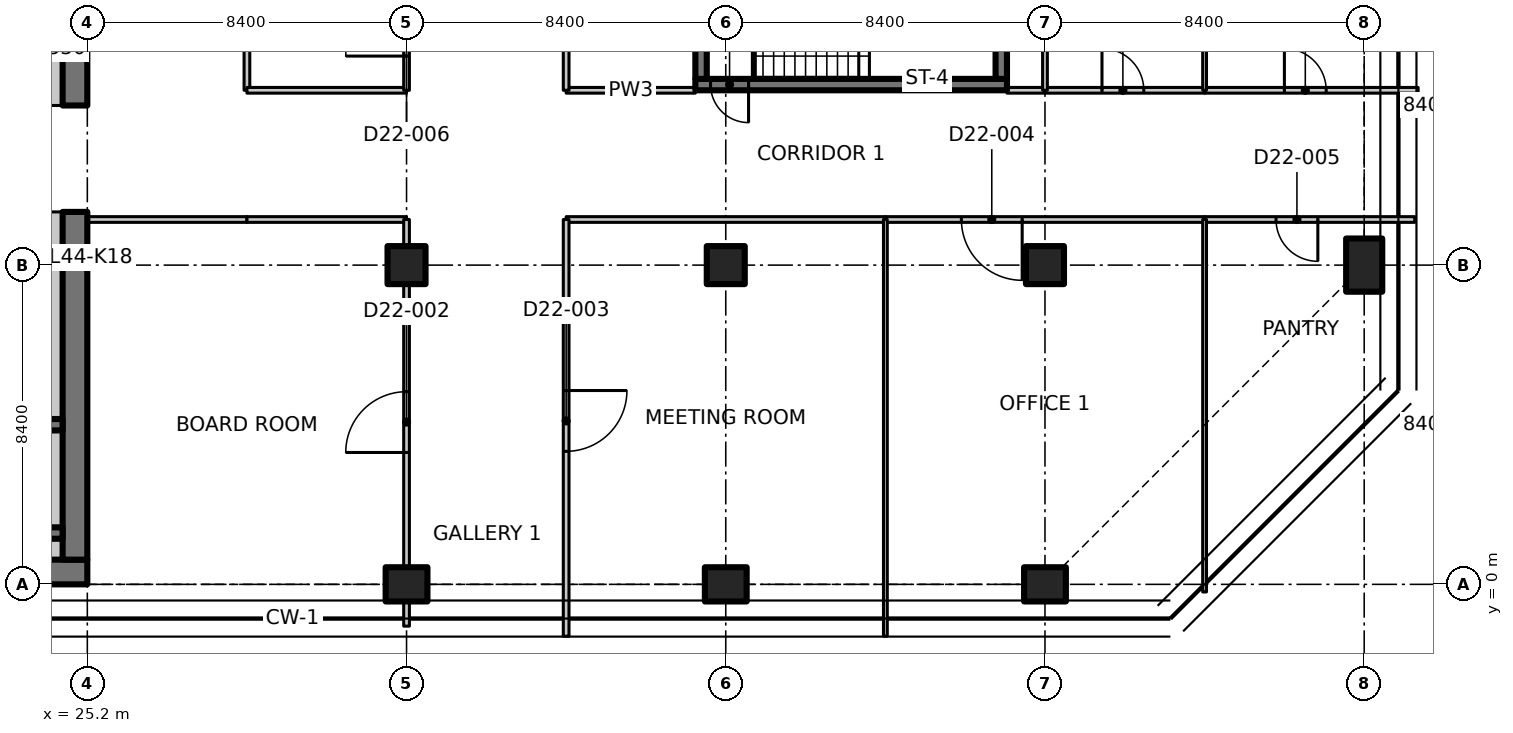
"""IFC4 building model, lengths in metres.
Left out: names, types, materials, properties, quantities, classifications, styles, units other than length and angle.
Written with IfcOpenShell. Run it as: python <this file> out.ifc"""

import sys

from ifc_helpers import new_model, si_unit, direction, frame, frame_2d, origin, origin_2d, place, context, subcontext, project, spatial, polyline, rectangle, outline, extrude, element, fill, save


model = new_model("IFC4")
c1 = context("Model", 3, precision=1e-05, world=origin(), true_north=direction((0.0, 1.0)))
c2 = subcontext(c1, "Body", "Model", "MODEL_VIEW")
j1 = project(units=[si_unit("LENGTHUNIT", "METRE"), si_unit("PLANEANGLEUNIT", "RADIAN")], contexts=[c1])
p1 = place(None, origin())
s1 = spatial("IfcSite", under=j1, at=p1, CompositionType="ELEMENT")
p2 = place(p1, origin())
s2 = spatial("IfcBuilding", under=s1, at=p2, CompositionType="ELEMENT")
p3 = place(p2, frame((0.0, 0.0, 177.6)))
s3 = spatial("IfcBuildingStorey", under=s2, at=p3, CompositionType="ELEMENT", Elevation=177.6)
p4 = place(p3, frame((33.6, 0.0, 0.0), z_axis=(0.0, 0.0, 1.0), x_axis=(0.0, 1.0, 0.0)))
e1 = element("IfcColumn", 1, at=p4, inside=s3, PredefinedType="COLUMN", context=c2, shape_type="SweptSolid", body=[
    extrude(rectangle(XDim=0.9, YDim=1.1, at=origin_2d()), origin(), (0.0, 0.0, 1.0), 3.35),
])
p5 = place(p3, frame((33.6, 8.4, 0.0), z_axis=(0.0, 0.0, 1.0), x_axis=(1.0, 0.0, 0.0)))
e2 = element("IfcColumn", 2, at=p5, inside=s3, PredefinedType="COLUMN", context=c2, shape_type="SweptSolid", body=[
    extrude(rectangle(XDim=1.0, YDim=1.0, at=origin_2d()), origin(), (0.0, 0.0, 1.0), 3.35),
])
p6 = place(p3, frame((42.0, 0.0, 0.0), z_axis=(0.0, 0.0, 1.0), x_axis=(0.0, 1.0, 0.0)))
e3 = element("IfcColumn", 3, at=p6, inside=s3, PredefinedType="COLUMN", context=c2, shape_type="SweptSolid", body=[
    extrude(rectangle(XDim=0.9, YDim=1.1, at=origin_2d()), origin(), (0.0, 0.0, 1.0), 3.35),
])
p7 = place(p3, frame((42.0, 8.4, 0.0), z_axis=(0.0, 0.0, 1.0), x_axis=(1.0, 0.0, 0.0)))
e4 = element("IfcColumn", 4, at=p7, inside=s3, PredefinedType="COLUMN", context=c2, shape_type="SweptSolid", body=[
    extrude(rectangle(XDim=1.0, YDim=1.0, at=origin_2d()), origin(), (0.0, 0.0, 1.0), 3.35),
])
p8 = place(p3, frame((50.4, 0.0, 0.0), z_axis=(0.0, 0.0, 1.0), x_axis=(0.0, 1.0, 0.0)))
e5 = element("IfcColumn", 5, at=p8, inside=s3, PredefinedType="COLUMN", context=c2, shape_type="SweptSolid", body=[
    extrude(rectangle(XDim=0.9, YDim=1.1, at=origin_2d()), origin(), (0.0, 0.0, 1.0), 3.35),
])
p9 = place(p3, frame((50.4, 8.4, 0.0), z_axis=(0.0, 0.0, 1.0), x_axis=(1.0, 0.0, 0.0)))
e6 = element("IfcColumn", 6, at=p9, inside=s3, PredefinedType="COLUMN", context=c2, shape_type="SweptSolid", body=[
    extrude(rectangle(XDim=1.0, YDim=1.0, at=origin_2d()), origin(), (0.0, 0.0, 1.0), 3.35),
])
p10 = place(p3, frame((58.8, 8.4, 0.0), z_axis=(0.0, 0.0, 1.0), x_axis=(1.0, 0.0, 0.0)))
e7 = element("IfcColumn", 7, at=p10, inside=s3, PredefinedType="COLUMN", context=c2, shape_type="SweptSolid", body=[
    extrude(rectangle(XDim=0.95, YDim=1.4, at=origin_2d()), origin(), (0.0, 0.0, 1.0), 3.35),
])
p11 = place(p3, frame((7.286, 0.325, 0.0), z_axis=(0.0, 0.0, 1.0), x_axis=(1.0, 0.0, 0.0)))
e8 = element("IfcWall", 8, at=p11, inside=s3, PredefinedType="SHEAR", context=c2, shape_type="SweptSolid", body=[
    extrude(rectangle(XDim=17.914, YDim=0.65, at=frame_2d((8.957, 0.0))), origin(), (0.0, 0.0, 1.0), 3.35),
])
p12 = place(p3, frame((24.875, 0.65, 0.0), z_axis=(0.0, 0.0, 1.0), x_axis=(0.0, 1.0, 0.0)))
e9 = element("IfcWall", 9, at=p12, inside=s3, PredefinedType="SHEAR", context=c2, shape_type="SweptSolid", body=[
    extrude(rectangle(XDim=9.15, YDim=0.65, at=frame_2d((4.575, 0.0))), origin(), (0.0, 0.0, 1.0), 3.35),
])
p13 = place(p3, frame((24.875, 12.6, 0.0), z_axis=(0.0, 0.0, 1.0), x_axis=(0.0, 1.0, 0.0)))
e10 = element("IfcWall", 10, at=p13, inside=s3, PredefinedType="SHEAR", context=c2, shape_type="SweptSolid", body=[
    extrude(rectangle(XDim=3.55, YDim=0.65, at=frame_2d((1.775, 0.0))), origin(), (0.0, 0.0, 1.0), 3.35),
])
p14 = place(p3, frame((24.275, 12.6, 0.0), z_axis=(0.0, 0.0, 1.0), x_axis=(0.0, 1.0, 0.0)))
e11 = element("IfcWall", 11, at=p14, inside=s3, PredefinedType="PARTITIONING", context=c2, shape_type="SweptSolid", body=[
    extrude(rectangle(XDim=3.0, YDim=0.55, at=frame_2d((1.5, 0.0))), origin(), (0.0, 0.0, 1.0), 3.35),
])
p15 = place(p3, frame((15.8, 1.35, 0.0), z_axis=(0.0, 0.0, 1.0), x_axis=(1.0, 0.0, 0.0)))
e12 = element("IfcWall", 12, at=p15, inside=s3, PredefinedType="SHEAR", context=c2, shape_type="SweptSolid", body=[
    extrude(rectangle(XDim=8.75, YDim=0.3, at=frame_2d((4.375, 0.0))), origin(), (0.0, 0.0, 1.0), 3.35),
])
p16 = place(p3, frame((15.8, 4.2, 0.0), z_axis=(0.0, 0.0, 1.0), x_axis=(1.0, 0.0, 0.0)))
e13 = element("IfcWall", 13, at=p16, inside=s3, PredefinedType="SHEAR", context=c2, shape_type="SweptSolid", body=[
    extrude(rectangle(XDim=8.75, YDim=0.3, at=frame_2d((4.375, 0.0))), origin(), (0.0, 0.0, 1.0), 3.35),
])
p17 = place(p16, frame((0.4, 0.0, 0.0)))
e14 = element("IfcOpeningElement", 14, at=p17, cuts=e13, PredefinedType="OPENING", context=c2, shape_type="SweptSolid", body=[
    extrude(rectangle(XDim=1.0, YDim=2.1, at=frame_2d((0.5, 1.05))), frame((0.0, 0.16, 0.0), z_axis=(0.0, -1.0, 0.0), x_axis=(1.0, 0.0, 0.0)), (0.0, 0.0, 1.0), 0.32),
])
p18 = place(p3, frame((49.4, 13.15, 0.0), z_axis=(0.0, 0.0, 1.0), x_axis=(-1.0, 0.0, 0.0)))
e15 = element("IfcWall", 15, at=p18, inside=s3, PredefinedType="SHEAR", context=c2, shape_type="SweptSolid", body=[
    extrude(rectangle(XDim=8.2, YDim=0.3, at=frame_2d((4.1, 0.0))), origin(), (0.0, 0.0, 1.0), 3.35),
])
p19 = place(p18, frame((6.8, 0.0, 0.0)))
e16 = element("IfcOpeningElement", 16, at=p19, cuts=e15, PredefinedType="OPENING", context=c2, shape_type="SweptSolid", body=[
    extrude(rectangle(XDim=1.0, YDim=2.1, at=frame_2d((0.5, 1.05))), frame((0.0, 0.16, 0.0), z_axis=(0.0, -1.0, 0.0), x_axis=(1.0, 0.0, 0.0)), (0.0, 0.0, 1.0), 0.32),
])
for number, where, z_axis, x_axis in (
    (17, (41.35, 13.3, 0.0), (0.0, 0.0, 1.0), (0.0, 1.0, 0.0)),
    (18, (49.25, 13.3, 0.0), (0.0, 0.0, 1.0), (0.0, 1.0, 0.0)),
):
    element("IfcWall", number, at=place(p3, frame(where, z_axis=z_axis, x_axis=x_axis)), inside=s3, PredefinedType="SHEAR", context=c2, shape_type="SweptSolid", body=[
        extrude(rectangle(XDim=2.55, YDim=0.3, at=frame_2d((1.275, 0.0))), origin(), (0.0, 0.0, 1.0), 3.35),
    ])
p20 = place(p3, frame((13.35, 0.925, 0.0), z_axis=(0.0, 0.0, 1.0), x_axis=(1.0, 0.0, 0.0)))
e19 = element("IfcWall", 19, at=p20, inside=s3, PredefinedType="PARTITIONING", context=c2, shape_type="SweptSolid", body=[
    extrude(rectangle(XDim=11.2, YDim=0.55, at=frame_2d((5.6, 0.0))), origin(), (0.0, 0.0, 1.0), 3.35),
])
p21 = place(p3, frame((24.275, 1.5, 0.0), z_axis=(0.0, 0.0, 1.0), x_axis=(0.0, 1.0, 0.0)))
e20 = element("IfcWall", 20, at=p21, inside=s3, PredefinedType="PARTITIONING", context=c2, shape_type="SweptSolid", body=[
    extrude(rectangle(XDim=2.55, YDim=0.55, at=frame_2d((1.275, 0.0))), origin(), (0.0, 0.0, 1.0), 3.35),
])
p22 = place(p3, frame((24.275, 4.35, 0.0), z_axis=(0.0, 0.0, 1.0), x_axis=(0.0, 1.0, 0.0)))
e21 = element("IfcWall", 21, at=p22, inside=s3, PredefinedType="PARTITIONING", context=c2, shape_type="SweptSolid", body=[
    extrude(rectangle(XDim=5.45, YDim=0.55, at=frame_2d((2.725, 0.0))), origin(), (0.0, 0.0, 1.0), 3.35),
])
p23 = place(p3, frame((29.4, 9.6, 0.0), z_axis=(0.0, 0.0, 1.0), x_axis=(-1.0, 0.0, 0.0)))
e22 = element("IfcWall", 22, at=p23, inside=s3, PredefinedType="PARTITIONING", context=c2, shape_type="SweptSolid", body=[
    extrude(rectangle(XDim=4.2, YDim=0.15, at=frame_2d((2.1, 0.0))), origin(), (0.0, 0.0, 1.0), 3.33),
])
p24 = place(p3, frame((29.4, 21.2, 0.0), z_axis=(0.0, 0.0, 1.0), x_axis=(0.0, -1.0, 0.0)))
e23 = element("IfcWall", 23, at=p24, inside=s3, PredefinedType="PARTITIONING", context=c2, shape_type="SweptSolid", body=[
    extrude(rectangle(XDim=8.2, YDim=0.15, at=frame_2d((4.1, 0.0))), origin(), (0.0, 0.0, 1.0), 3.33),
])
p25 = place(p3, frame((33.6, 9.6, 0.0), z_axis=(0.0, 0.0, 1.0), x_axis=(-1.0, 0.0, 0.0)))
e24 = element("IfcWall", 24, at=p25, inside=s3, PredefinedType="PARTITIONING", context=c2, shape_type="SweptSolid", body=[
    extrude(rectangle(XDim=4.2, YDim=0.15, at=frame_2d((2.1, 0.0))), origin(), (0.0, 0.0, 1.0), 3.33),
])
p26 = place(p3, frame((46.2, 9.6, 0.0), z_axis=(0.0, 0.0, 1.0), x_axis=(-1.0, 0.0, 0.0)))
e25 = element("IfcWall", 25, at=p26, inside=s3, PredefinedType="PARTITIONING", context=c2, shape_type="SweptSolid", body=[
    extrude(rectangle(XDim=8.4, YDim=0.15, at=frame_2d((4.2, 0.0))), origin(), (0.0, 0.0, 1.0), 3.33),
])
p27 = place(p3, frame((54.6, 9.6, 0.0), z_axis=(0.0, 0.0, 1.0), x_axis=(-1.0, 0.0, 0.0)))
e26 = element("IfcWall", 26, at=p27, inside=s3, PredefinedType="PARTITIONING", context=c2, shape_type="SweptSolid", body=[
    extrude(rectangle(XDim=8.4, YDim=0.15, at=frame_2d((4.2, 0.0))), origin(), (0.0, 0.0, 1.0), 3.33),
])
p28 = place(p27, frame((4.8, 0.0, 0.0)))
e27 = element("IfcOpeningElement", 27, at=p28, cuts=e26, PredefinedType="OPENING", context=c2, shape_type="SweptSolid", body=[
    extrude(rectangle(XDim=1.6, YDim=2.1, at=frame_2d((0.8, 1.05))), frame((0.0, 0.085, 0.0), z_axis=(0.0, -1.0, 0.0), x_axis=(1.0, 0.0, 0.0)), (0.0, 0.0, 1.0), 0.17),
])
p29 = place(p3, frame((60.131, 9.6, 0.0), z_axis=(0.0, 0.0, 1.0), x_axis=(-1.0, 0.0, 0.0)))
e28 = element("IfcWall", 28, at=p29, inside=s3, PredefinedType="PARTITIONING", context=c2, shape_type="SweptSolid", body=[
    extrude(outline(polyline([(0.0, 0.0), (5.531, 0.0), (5.531, 3.33), (1.781, 3.33), (1.779, 2.98), (0.883, 2.98), (0.881, 3.33), (0.25, 3.33), (0.0, 3.33), (0.0, 0.0)])), frame((0.0, 0.075, 0.0), z_axis=(0.0, -1.0, 0.0), x_axis=(1.0, 0.0, 0.0)), (0.0, 0.0, 1.0), 0.15),
])
p30 = place(p29, frame((2.551, 0.0, 0.0)))
e29 = element("IfcOpeningElement", 29, at=p30, cuts=e28, PredefinedType="OPENING", context=c2, shape_type="SweptSolid", body=[
    extrude(rectangle(XDim=1.1, YDim=2.1, at=frame_2d((0.55, 1.05))), frame((0.0, 0.085, 0.0), z_axis=(0.0, -1.0, 0.0), x_axis=(1.0, 0.0, 0.0)), (0.0, 0.0, 1.0), 0.17),
])
p31 = place(p3, frame((29.4, 13.0, 0.0), z_axis=(0.0, 0.0, 1.0), x_axis=(1.0, 0.0, 0.0)))
e30 = element("IfcWall", 30, at=p31, inside=s3, PredefinedType="PARTITIONING", context=c2, shape_type="SweptSolid", body=[
    extrude(rectangle(XDim=4.2, YDim=0.15, at=frame_2d((2.1, 0.0))), origin(), (0.0, 0.0, 1.0), 3.33),
])
p32 = place(p3, frame((37.8, 13.0, 0.0), z_axis=(0.0, 0.0, 1.0), x_axis=(1.0, 0.0, 0.0)))
e31 = element("IfcWall", 31, at=p32, inside=s3, PredefinedType="PARTITIONING", context=c2, shape_type="SweptSolid", body=[
    extrude(rectangle(XDim=3.4, YDim=0.15, at=frame_2d((1.7, 0.0))), origin(), (0.0, 0.0, 1.0), 3.33),
])
p33 = place(p3, frame((49.4, 13.0, 0.0), z_axis=(0.0, 0.0, 1.0), x_axis=(1.0, 0.0, 0.0)))
e32 = element("IfcWall", 32, at=p33, inside=s3, PredefinedType="PARTITIONING", context=c2, shape_type="SweptSolid", body=[
    extrude(rectangle(XDim=1.0, YDim=0.15, at=frame_2d((0.5, 0.0))), origin(), (0.0, 0.0, 1.0), 3.33),
])
p34 = place(p3, frame((50.4, 13.0, 0.0), z_axis=(0.0, 0.0, 1.0), x_axis=(1.0, 0.0, 0.0)))
e33 = element("IfcWall", 33, at=p34, inside=s3, PredefinedType="PARTITIONING", context=c2, shape_type="SweptSolid", body=[
    extrude(rectangle(XDim=4.2, YDim=0.15, at=frame_2d((2.1, 0.0))), origin(), (0.0, 0.0, 1.0), 3.33),
])
p35 = place(p34, frame((1.5, 0.0, 0.0)))
e34 = element("IfcOpeningElement", 34, at=p35, cuts=e33, PredefinedType="OPENING", context=c2, shape_type="SweptSolid", body=[
    extrude(rectangle(XDim=1.1, YDim=2.1, at=frame_2d((0.55, 1.05))), frame((0.0, 0.085, 0.0), z_axis=(0.0, -1.0, 0.0), x_axis=(1.0, 0.0, 0.0)), (0.0, 0.0, 1.0), 0.17),
])
p36 = place(p3, frame((54.6, 13.0, 0.0), z_axis=(0.0, 0.0, 1.0), x_axis=(1.0, 0.0, 0.0)))
e35 = element("IfcWall", 35, at=p36, inside=s3, PredefinedType="PARTITIONING", context=c2, shape_type="SweptSolid", body=[
    extrude(outline(polyline([(0.0, 0.0), (5.619, 0.0), (5.619, 3.33), (5.28, 3.33), (4.65, 3.33), (4.648, 2.98), (3.752, 2.98), (3.75, 3.33), (0.0, 3.33), (0.0, 0.0)])), frame((0.0, 0.075, 0.0), z_axis=(0.0, -1.0, 0.0), x_axis=(1.0, 0.0, 0.0)), (0.0, 0.0, 1.0), 0.15),
])
p37 = place(p36, frame((2.1, 0.0, 0.0)))
e36 = element("IfcOpeningElement", 36, at=p37, cuts=e35, PredefinedType="OPENING", context=c2, shape_type="SweptSolid", body=[
    extrude(rectangle(XDim=1.1, YDim=2.1, at=frame_2d((0.55, 1.05))), frame((0.0, 0.085, 0.0), z_axis=(0.0, -1.0, 0.0), x_axis=(1.0, 0.0, 0.0)), (0.0, 0.0, 1.0), 0.17),
])
p38 = place(p3, frame((33.6, -1.1, 0.0), z_axis=(0.0, 0.0, 1.0), x_axis=(0.0, 1.0, 0.0)))
e37 = element("IfcWall", 37, at=p38, inside=s3, PredefinedType="PARTITIONING", context=c2, shape_type="SweptSolid", body=[
    extrude(rectangle(XDim=0.63, YDim=0.15, at=frame_2d((0.315, 0.0))), origin(), (0.0, 0.0, 1.0), 3.33),
])
p39 = place(p3, frame((33.6, 0.47, 0.0), z_axis=(0.0, 0.0, 1.0), x_axis=(0.0, 1.0, 0.0)))
e38 = element("IfcWall", 38, at=p39, inside=s3, PredefinedType="PARTITIONING", context=c2, shape_type="SweptSolid", body=[
    extrude(rectangle(XDim=7.41, YDim=0.15, at=frame_2d((3.705, 0.0))), origin(), (0.0, 0.0, 1.0), 3.33),
])
p40 = place(p39, frame((3.0, 0.0, 0.0)))
e39 = element("IfcOpeningElement", 39, at=p40, cuts=e38, PredefinedType="OPENING", context=c2, shape_type="SweptSolid", body=[
    extrude(rectangle(XDim=1.6, YDim=2.1, at=frame_2d((0.8, 1.05))), frame((0.0, 0.085, 0.0), z_axis=(0.0, -1.0, 0.0), x_axis=(1.0, 0.0, 0.0)), (0.0, 0.0, 1.0), 0.17),
])
p41 = place(p3, frame((33.6, 8.92, 0.0), z_axis=(0.0, 0.0, 1.0), x_axis=(0.0, 1.0, 0.0)))
e40 = element("IfcWall", 40, at=p41, inside=s3, PredefinedType="PARTITIONING", context=c2, shape_type="SweptSolid", body=[
    extrude(rectangle(XDim=0.68, YDim=0.15, at=frame_2d((0.34, 0.0))), origin(), (0.0, 0.0, 1.0), 3.33),
])
p42 = place(p3, frame((37.8, 9.6, 0.0), z_axis=(0.0, 0.0, 1.0), x_axis=(0.0, -1.0, 0.0)))
e41 = element("IfcWall", 41, at=p42, inside=s3, PredefinedType="PARTITIONING", context=c2, shape_type="SweptSolid", body=[
    extrude(outline(polyline([(0.0, 0.0), (10.965, 0.0), (10.965, 3.33), (10.7, 3.33), (10.05, 3.33), (10.048, 2.98), (9.152, 2.98), (9.15, 3.33), (0.0, 3.33), (0.0, 0.0)])), frame((0.0, 0.075, 0.0), z_axis=(0.0, -1.0, 0.0), x_axis=(1.0, 0.0, 0.0)), (0.0, 0.0, 1.0), 0.15),
])
p43 = place(p42, frame((4.5, 0.0, 0.0)))
e42 = element("IfcOpeningElement", 42, at=p43, cuts=e41, PredefinedType="OPENING", context=c2, shape_type="SweptSolid", body=[
    extrude(rectangle(XDim=1.6, YDim=2.1, at=frame_2d((0.8, 1.05))), frame((0.0, 0.085, 0.0), z_axis=(0.0, -1.0, 0.0), x_axis=(1.0, 0.0, 0.0)), (0.0, 0.0, 1.0), 0.17),
])
p44 = place(p3, frame((46.2, 9.6, 0.0), z_axis=(0.0, 0.0, 1.0), x_axis=(0.0, -1.0, 0.0)))
e43 = element("IfcWall", 43, at=p44, inside=s3, PredefinedType="PARTITIONING", context=c2, shape_type="SweptSolid", body=[
    extrude(outline(polyline([(0.0, 0.0), (10.965, 0.0), (10.965, 3.33), (10.7, 3.33), (10.05, 3.33), (10.048, 2.98), (9.152, 2.98), (9.15, 3.33), (0.0, 3.33), (0.0, 0.0)])), frame((0.0, 0.05, 0.0), z_axis=(0.0, -1.0, 0.0), x_axis=(1.0, 0.0, 0.0)), (0.0, 0.0, 1.0), 0.1),
])
p45 = place(p3, frame((54.6, 9.6, 0.0), z_axis=(0.0, 0.0, 1.0), x_axis=(0.0, -1.0, 0.0)))
e44 = element("IfcWall", 44, at=p45, inside=s3, PredefinedType="PARTITIONING", context=c2, shape_type="SweptSolid", body=[
    extrude(outline(polyline([(0.0, 0.0), (9.8, 0.0), (9.8, 3.33), (6.066, 3.33), (6.064, 2.98), (4.736, 2.98), (4.734, 3.33), (0.0, 3.33), (0.0, 0.0)])), frame((0.0, 0.05, 0.0), z_axis=(0.0, -1.0, 0.0), x_axis=(1.0, 0.0, 0.0)), (0.0, 0.0, 1.0), 0.1),
])
p46 = place(p3, frame((33.6, 13.0, 0.0), z_axis=(0.0, 0.0, 1.0), x_axis=(0.0, 1.0, 0.0)))
e45 = element("IfcWall", 45, at=p46, inside=s3, PredefinedType="PARTITIONING", context=c2, shape_type="SweptSolid", body=[
    extrude(rectangle(XDim=3.28, YDim=0.15, at=frame_2d((1.64, 0.0))), origin(), (0.0, 0.0, 1.0), 3.33),
])
p47 = place(p46, frame((0.9, 0.0, 0.0)))
e46 = element("IfcOpeningElement", 46, at=p47, cuts=e45, PredefinedType="OPENING", context=c2, shape_type="SweptSolid", body=[
    extrude(rectangle(XDim=1.6, YDim=2.1, at=frame_2d((0.8, 1.05))), frame((0.0, 0.085, 0.0), z_axis=(0.0, -1.0, 0.0), x_axis=(1.0, 0.0, 0.0)), (0.0, 0.0, 1.0), 0.17),
])
p48 = place(p3, frame((37.8, 30.243, 0.0), z_axis=(0.0, 0.0, 1.0), x_axis=(0.0, -1.0, 0.0)))
e47 = element("IfcWall", 47, at=p48, inside=s3, PredefinedType="PARTITIONING", context=c2, shape_type="SweptSolid", body=[
    extrude(outline(polyline([(0.0, 0.0), (17.243, 0.0), (17.243, 3.33), (5.493, 3.33), (5.491, 2.98), (4.595, 2.98), (4.593, 3.33), (0.0, 3.33), (0.0, 0.0)])), frame((0.0, 0.075, 0.0), z_axis=(0.0, -1.0, 0.0), x_axis=(1.0, 0.0, 0.0)), (0.0, 0.0, 1.0), 0.15),
])
p49 = place(p48, frame((8.0, 0.0, 0.0)))
e48 = element("IfcOpeningElement", 48, at=p49, cuts=e47, PredefinedType="OPENING", context=c2, shape_type="SweptSolid", body=[
    extrude(rectangle(XDim=1.6, YDim=2.1, at=frame_2d((0.8, 1.05))), frame((0.0, 0.085, 0.0), z_axis=(0.0, -1.0, 0.0), x_axis=(1.0, 0.0, 0.0)), (0.0, 0.0, 1.0), 0.17),
])
p50 = place(p3, frame((50.4, 16.28, 0.0), z_axis=(0.0, 0.0, 1.0), x_axis=(0.0, -1.0, 0.0)))
e49 = element("IfcWall", 49, at=p50, inside=s3, PredefinedType="PARTITIONING", context=c2, shape_type="SweptSolid", body=[
    extrude(rectangle(XDim=3.28, YDim=0.125, at=frame_2d((1.64, 0.0))), origin(), (0.0, 0.0, 1.0), 3.33),
])
p51 = place(p3, frame((54.6, 25.502, 0.0), z_axis=(0.0, 0.0, 1.0), x_axis=(0.0, -1.0, 0.0)))
e50 = element("IfcWall", 50, at=p51, inside=s3, PredefinedType="PARTITIONING", context=c2, shape_type="SweptSolid", body=[
    extrude(outline(polyline([(0.0, 0.0), (12.502, 0.0), (12.502, 3.33), (5.168, 3.33), (5.166, 2.98), (3.839, 2.98), (3.837, 3.33), (0.103, 3.33), (0.0, 3.33), (0.0, 0.0)])), frame((0.0, 0.05, 0.0), z_axis=(0.0, -1.0, 0.0), x_axis=(1.0, 0.0, 0.0)), (0.0, 0.0, 1.0), 0.1),
])
p52 = place(p19, origin())
e51 = element("IfcDoor", 51, at=p52, inside=s3, OperationType="SINGLE_SWING_RIGHT", PredefinedType="DOOR", context=c2, shape_type="SweptSolid", body=[
    extrude(rectangle(XDim=1.0, YDim=2.1, at=frame_2d((0.5, 1.05))), frame((0.0, 0.025, 0.0), z_axis=(0.0, -1.0, 0.0), x_axis=(1.0, 0.0, 0.0)), (0.0, 0.0, 1.0), 0.05),
])
fill(e16, e51)
p53 = place(p40, origin())
e52 = element("IfcDoor", 52, at=p53, inside=s3, OperationType="DOUBLE_DOOR_SINGLE_SWING", PredefinedType="DOOR", context=c2, shape_type="SweptSolid", body=[
    extrude(rectangle(XDim=1.6, YDim=2.1, at=frame_2d((0.8, 1.05))), frame((0.0, 0.025, 0.0), z_axis=(0.0, -1.0, 0.0), x_axis=(1.0, 0.0, 0.0)), (0.0, 0.0, 1.0), 0.05),
])
fill(e39, e52)
p54 = place(p43, origin())
e53 = element("IfcDoor", 53, at=p54, inside=s3, OperationType="DOUBLE_DOOR_SINGLE_SWING", PredefinedType="DOOR", context=c2, shape_type="SweptSolid", body=[
    extrude(rectangle(XDim=1.6, YDim=2.1, at=frame_2d((0.8, 1.05))), frame((0.0, 0.025, 0.0), z_axis=(0.0, -1.0, 0.0), x_axis=(1.0, 0.0, 0.0)), (0.0, 0.0, 1.0), 0.05),
])
fill(e42, e53)
p55 = place(p28, origin())
e54 = element("IfcDoor", 54, at=p55, inside=s3, OperationType="DOUBLE_DOOR_SINGLE_SWING", PredefinedType="DOOR", context=c2, shape_type="SweptSolid", body=[
    extrude(rectangle(XDim=1.6, YDim=2.1, at=frame_2d((0.8, 1.05))), frame((0.0, 0.025, 0.0), z_axis=(0.0, -1.0, 0.0), x_axis=(1.0, 0.0, 0.0)), (0.0, 0.0, 1.0), 0.05),
])
fill(e27, e54)
p56 = place(p30, origin())
e55 = element("IfcDoor", 55, at=p56, inside=s3, OperationType="SINGLE_SWING_LEFT", PredefinedType="DOOR", context=c2, shape_type="SweptSolid", body=[
    extrude(rectangle(XDim=1.1, YDim=2.1, at=frame_2d((0.55, 1.05))), frame((0.0, 0.025, 0.0), z_axis=(0.0, -1.0, 0.0), x_axis=(1.0, 0.0, 0.0)), (0.0, 0.0, 1.0), 0.05),
])
fill(e29, e55)
p57 = place(p47, origin())
e56 = element("IfcDoor", 56, at=p57, inside=s3, OperationType="DOUBLE_DOOR_SINGLE_SWING", PredefinedType="DOOR", context=c2, shape_type="SweptSolid", body=[
    extrude(rectangle(XDim=1.6, YDim=2.1, at=frame_2d((0.8, 1.05))), frame((0.0, 0.025, 0.0), z_axis=(0.0, -1.0, 0.0), x_axis=(1.0, 0.0, 0.0)), (0.0, 0.0, 1.0), 0.05),
])
fill(e46, e56)
p58 = place(p35, origin())
e57 = element("IfcDoor", 57, at=p58, inside=s3, OperationType="SINGLE_SWING_LEFT", PredefinedType="DOOR", context=c2, shape_type="SweptSolid", body=[
    extrude(rectangle(XDim=1.1, YDim=2.1, at=frame_2d((0.55, 1.05))), frame((0.0, 0.025, 0.0), z_axis=(0.0, -1.0, 0.0), x_axis=(1.0, 0.0, 0.0)), (0.0, 0.0, 1.0), 0.05),
])
fill(e34, e57)
p59 = place(p37, origin())
e58 = element("IfcDoor", 58, at=p59, inside=s3, OperationType="SINGLE_SWING_LEFT", PredefinedType="DOOR", context=c2, shape_type="SweptSolid", body=[
    extrude(rectangle(XDim=1.1, YDim=2.1, at=frame_2d((0.55, 1.05))), frame((0.0, 0.025, 0.0), z_axis=(0.0, -1.0, 0.0), x_axis=(1.0, 0.0, 0.0)), (0.0, 0.0, 1.0), 0.05),
])
fill(e36, e58)
save(model, sys.argv[1])
